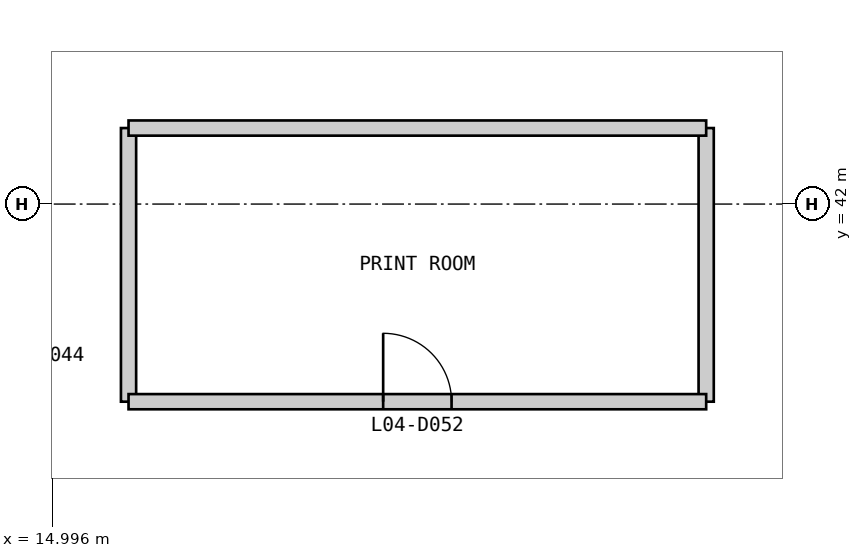
"""IFC4 building model, lengths in metres.
Left out: names, types, materials, properties, quantities, classifications, styles, units other than length and angle.
Written with IfcOpenShell. Run it as: python <this file> out.ifc"""

import sys

from ifc_helpers import new_model, si_unit, direction, frame, frame_2d, origin, place, context, subcontext, project, spatial, rectangle, extrude, element, fill, save


model = new_model("IFC4")
c1 = context("Model", 3, precision=1e-05, world=origin(), true_north=direction((0.0, 1.0)))
c2 = subcontext(c1, "Body", "Model", "MODEL_VIEW")
j1 = project(units=[si_unit("LENGTHUNIT", "METRE"), si_unit("PLANEANGLEUNIT", "RADIAN")], contexts=[c1])
p1 = place(None, origin())
s1 = spatial("IfcSite", under=j1, at=p1, CompositionType="ELEMENT")
p2 = place(p1, origin())
s2 = spatial("IfcBuilding", under=s1, at=p2, CompositionType="ELEMENT")
p3 = place(p2, frame((0.0, 0.0, 21.4)))
s3 = spatial("IfcBuildingStorey", under=s2, at=p3, CompositionType="ELEMENT", Elevation=21.4)
p4 = place(p3, frame((16.0, 39.4, 0.0), z_axis=(0.0, 0.0, 1.0), x_axis=(0.0, 1.0, 0.0)))
e1 = element("IfcWall", 1, at=p4, inside=s3, PredefinedType="PARTITIONING", context=c2, shape_type="SweptSolid", body=[
    extrude(rectangle(XDim=3.6, YDim=0.2, at=frame_2d((1.8, 0.0))), origin(), (0.0, 0.0, 1.0), 3.843),
])
p5 = place(p3, frame((23.6, 39.4, 0.0), z_axis=(0.0, 0.0, 1.0), x_axis=(0.0, 1.0, 0.0)))
e2 = element("IfcWall", 2, at=p5, inside=s3, PredefinedType="PARTITIONING", context=c2, shape_type="SweptSolid", body=[
    extrude(rectangle(XDim=3.6, YDim=0.2, at=frame_2d((1.8, 0.0))), origin(), (0.0, 0.0, 1.0), 4.5),
])
p6 = place(p3, frame((16.0, 39.4, 0.0), z_axis=(0.0, 0.0, 1.0), x_axis=(1.0, 0.0, 0.0)))
e3 = element("IfcWall", 3, at=p6, inside=s3, PredefinedType="PARTITIONING", context=c2, shape_type="SweptSolid", body=[
    extrude(rectangle(XDim=7.6, YDim=0.2, at=frame_2d((3.8, 0.0))), origin(), (0.0, 0.0, 1.0), 4.5),
])
p7 = place(p6, frame((3.35, 0.0, 0.0)))
e4 = element("IfcOpeningElement", 4, at=p7, cuts=e3, PredefinedType="OPENING", context=c2, shape_type="SweptSolid", body=[
    extrude(rectangle(XDim=0.9, YDim=2.2, at=frame_2d((0.45, 1.1))), frame((0.0, 0.11, 0.0), z_axis=(0.0, -1.0, 0.0), x_axis=(1.0, 0.0, 0.0)), (0.0, 0.0, 1.0), 0.22),
])
p8 = place(p3, frame((16.0, 43.0, 0.0), z_axis=(0.0, 0.0, 1.0), x_axis=(1.0, 0.0, 0.0)))
e5 = element("IfcWall", 5, at=p8, inside=s3, PredefinedType="PARTITIONING", context=c2, shape_type="SweptSolid", body=[
    extrude(rectangle(XDim=7.6, YDim=0.2, at=frame_2d((3.8, 0.0))), origin(), (0.0, 0.0, 1.0), 4.5),
])
p9 = place(p7, origin())
e6 = element("IfcDoor", 6, at=p9, inside=s3, OperationType="SINGLE_SWING_LEFT", PredefinedType="DOOR", context=c2, shape_type="SweptSolid", body=[
    extrude(rectangle(XDim=0.9, YDim=2.2, at=frame_2d((0.45, 1.1))), frame((0.0, 0.025, 0.0), z_axis=(0.0, -1.0, 0.0), x_axis=(1.0, 0.0, 0.0)), (0.0, 0.0, 1.0), 0.05),
])
fill(e4, e6)
save(model, sys.argv[1])
